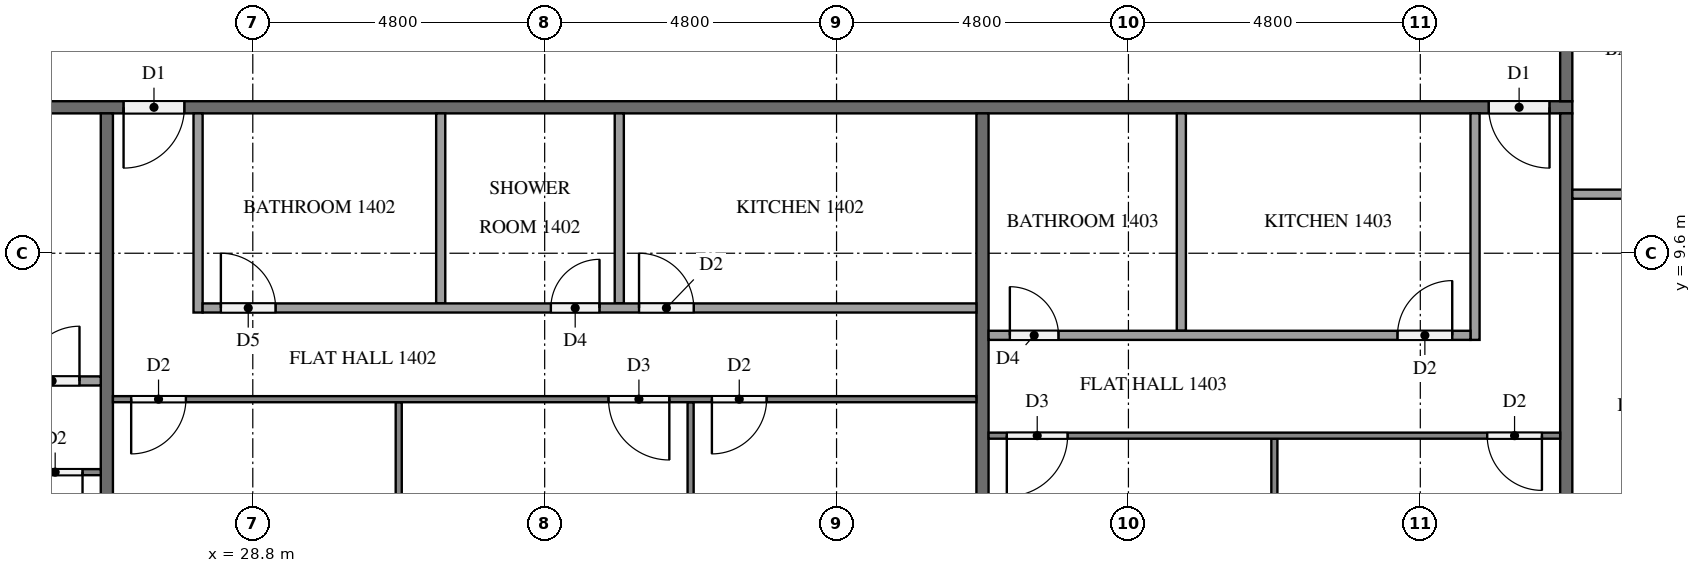
"""IFC4 building model, lengths in metres.
Left out: names, types, materials, properties, quantities, classifications, styles, units other than length and angle.
Written with IfcOpenShell. Run it as: python <this file> out.ifc"""

import sys

from ifc_helpers import new_model, si_unit, direction, frame, frame_2d, origin, place, context, subcontext, project, spatial, rectangle, extrude, element, fill, save


model = new_model("IFC4")
c1 = context("Model", 3, precision=1e-05, world=origin(), true_north=direction((0.0, 1.0)))
c2 = subcontext(c1, "Body", "Model", "MODEL_VIEW")
j1 = project(units=[si_unit("LENGTHUNIT", "METRE"), si_unit("PLANEANGLEUNIT", "RADIAN")], contexts=[c1])
p1 = place(None, origin())
s1 = spatial("IfcSite", under=j1, at=p1, CompositionType="ELEMENT")
p2 = place(p1, origin())
s2 = spatial("IfcBuilding", under=s1, at=p2, CompositionType="ELEMENT")
p3 = place(p2, frame((0.0, 0.0, 59.3)))
s3 = spatial("IfcBuildingStorey", under=s2, at=p3, CompositionType="ELEMENT", Elevation=59.3)
p4 = place(p3, frame((50.5, 12.0, 0.0), z_axis=(0.0, 0.0, 1.0), x_axis=(-1.0, 0.0, 0.0)))
e1 = element("IfcWall", 1, at=p4, inside=s3, PredefinedType="PARTITIONING", context=c2, shape_type="SweptSolid", body=[
    extrude(rectangle(XDim=38.6, YDim=0.2, at=frame_2d((19.3, 0.0))), origin(), (0.0, 0.0, 1.0), 3.2),
])
p5 = place(p4, frame((37.225, 0.0, 0.0)))
e2 = element("IfcOpeningElement", 2, at=p5, cuts=e1, PredefinedType="OPENING", context=c2, shape_type="SweptSolid", body=[
    extrude(rectangle(XDim=1.0, YDim=2.1, at=frame_2d((0.5, 1.05))), frame((0.0, 0.11, 0.0), z_axis=(0.0, -1.0, 0.0), x_axis=(1.0, 0.0, 0.0)), (0.0, 0.0, 1.0), 0.22),
])
p6 = place(p4, frame((22.825, 0.0, 0.0)))
e3 = element("IfcOpeningElement", 3, at=p6, cuts=e1, PredefinedType="OPENING", context=c2, shape_type="SweptSolid", body=[
    extrude(rectangle(XDim=1.0, YDim=2.1, at=frame_2d((0.5, 1.05))), frame((0.0, 0.11, 0.0), z_axis=(0.0, -1.0, 0.0), x_axis=(1.0, 0.0, 0.0)), (0.0, 0.0, 1.0), 0.22),
])
p7 = place(p4, frame((0.375, 0.0, 0.0)))
e4 = element("IfcOpeningElement", 4, at=p7, cuts=e1, PredefinedType="OPENING", context=c2, shape_type="SweptSolid", body=[
    extrude(rectangle(XDim=1.0, YDim=2.1, at=frame_2d((0.5, 1.05))), frame((0.0, 0.11, 0.0), z_axis=(0.0, -1.0, 0.0), x_axis=(1.0, 0.0, 0.0)), (0.0, 0.0, 1.0), 0.22),
])
p8 = place(p3, frame((50.4, 40.7, 0.0), z_axis=(0.0, 0.0, 1.0), x_axis=(0.0, -1.0, 0.0)))
e5 = element("IfcWall", 5, at=p8, inside=s3, PredefinedType="PARTITIONING", context=c2, shape_type="SweptSolid", body=[
    extrude(rectangle(XDim=28.6, YDim=0.2, at=frame_2d((14.3, 0.0))), origin(), (0.0, 0.0, 1.0), 3.2),
])
p9 = place(p8, frame((24.175, 0.0, 0.0)))
e6 = element("IfcOpeningElement", 6, at=p9, cuts=e5, PredefinedType="OPENING", context=c2, shape_type="SweptSolid", body=[
    extrude(rectangle(XDim=1.0, YDim=2.1, at=frame_2d((0.5, 1.05))), frame((0.0, 0.11, 0.0), z_axis=(0.0, -1.0, 0.0), x_axis=(1.0, 0.0, 0.0)), (0.0, 0.0, 1.0), 0.22),
])
p10 = place(p8, frame((22.625, 0.0, 0.0)))
e7 = element("IfcOpeningElement", 7, at=p10, cuts=e5, PredefinedType="OPENING", context=c2, shape_type="SweptSolid", body=[
    extrude(rectangle(XDim=1.0, YDim=2.1, at=frame_2d((0.5, 1.05))), frame((0.0, 0.11, 0.0), z_axis=(0.0, -1.0, 0.0), x_axis=(1.0, 0.0, 0.0)), (0.0, 0.0, 1.0), 0.22),
])
p11 = place(p8, frame((10.625, 0.0, 0.0)))
e8 = element("IfcOpeningElement", 8, at=p11, cuts=e5, PredefinedType="OPENING", context=c2, shape_type="SweptSolid", body=[
    extrude(rectangle(XDim=1.0, YDim=2.1, at=frame_2d((0.5, 1.05))), frame((0.0, 0.11, 0.0), z_axis=(0.0, -1.0, 0.0), x_axis=(1.0, 0.0, 0.0)), (0.0, 0.0, 1.0), 0.22),
])
for number, where, z_axis, x_axis in (
    (9, (26.4, 11.9, 0.0), (0.0, 0.0, 1.0), (0.0, -1.0, 0.0)),
    (10, (40.8, 11.9, 0.0), (0.0, 0.0, 1.0), (0.0, -1.0, 0.0)),
    (11, (50.4, 11.9, 0.0), (0.0, 0.0, 1.0), (0.0, -1.0, 0.0)),
):
    element("IfcWall", number, at=place(p3, frame(where, z_axis=z_axis, x_axis=x_axis)), inside=s3, PredefinedType="PARTITIONING", context=c2, shape_type="SweptSolid", body=[
        extrude(rectangle(XDim=11.8, YDim=0.2, at=frame_2d((5.9, 0.0))), origin(), (0.0, 0.0, 1.0), 3.2),
    ])
p12 = place(p3, frame((26.3, 6.0, 0.0), z_axis=(0.0, 0.0, 1.0), x_axis=(-1.0, 0.0, 0.0)))
e12 = element("IfcWall", 12, at=p12, inside=s3, PredefinedType="PARTITIONING", context=c2, shape_type="SweptSolid", body=[
    extrude(rectangle(XDim=14.2, YDim=0.1, at=frame_2d((7.1, 0.0))), origin(), (0.0, 0.0, 1.0), 3.2),
])
p13 = place(p12, frame((9.85, 0.0, 0.0)))
e13 = element("IfcOpeningElement", 13, at=p13, cuts=e12, PredefinedType="OPENING", context=c2, shape_type="SweptSolid", body=[
    extrude(rectangle(XDim=0.9, YDim=2.1, at=frame_2d((0.45, 1.05))), frame((0.0, 0.06, 0.0), z_axis=(0.0, -1.0, 0.0), x_axis=(1.0, 0.0, 0.0)), (0.0, 0.0, 1.0), 0.12),
])
p14 = place(p12, frame((8.15, 0.0, 0.0)))
e14 = element("IfcOpeningElement", 14, at=p14, cuts=e12, PredefinedType="OPENING", context=c2, shape_type="SweptSolid", body=[
    extrude(rectangle(XDim=1.0, YDim=2.1, at=frame_2d((0.5, 1.05))), frame((0.0, 0.06, 0.0), z_axis=(0.0, -1.0, 0.0), x_axis=(1.0, 0.0, 0.0)), (0.0, 0.0, 1.0), 0.12),
])
p15 = place(p12, frame((0.3, 0.0, 0.0)))
e15 = element("IfcOpeningElement", 15, at=p15, cuts=e12, PredefinedType="OPENING", context=c2, shape_type="SweptSolid", body=[
    extrude(rectangle(XDim=0.9, YDim=2.1, at=frame_2d((0.45, 1.05))), frame((0.0, 0.06, 0.0), z_axis=(0.0, -1.0, 0.0), x_axis=(1.0, 0.0, 0.0)), (0.0, 0.0, 1.0), 0.12),
])
p16 = place(p3, frame((13.575, 7.5, 0.0), z_axis=(0.0, 0.0, 1.0), x_axis=(1.0, 0.0, 0.0)))
e16 = element("IfcWall", 16, at=p16, inside=s3, PredefinedType="PARTITIONING", context=c2, shape_type="SweptSolid", body=[
    extrude(rectangle(XDim=12.725, YDim=0.15, at=frame_2d((6.363, 0.0))), origin(), (0.0, 0.0, 1.0), 3.2),
])
p17 = place(p16, frame((2.69, 0.0, 0.0)))
e17 = element("IfcOpeningElement", 17, at=p17, cuts=e16, PredefinedType="OPENING", context=c2, shape_type="SweptSolid", body=[
    extrude(rectangle(XDim=0.9, YDim=2.1, at=frame_2d((0.45, 1.05))), frame((0.0, 0.085, 0.0), z_axis=(0.0, -1.0, 0.0), x_axis=(1.0, 0.0, 0.0)), (0.0, 0.0, 1.0), 0.17),
])
p18 = place(p16, frame((4.24, 0.0, 0.0)))
e18 = element("IfcOpeningElement", 18, at=p18, cuts=e16, PredefinedType="OPENING", context=c2, shape_type="SweptSolid", body=[
    extrude(rectangle(XDim=0.8, YDim=2.1, at=frame_2d((0.4, 1.05))), frame((0.0, 0.085, 0.0), z_axis=(0.0, -1.0, 0.0), x_axis=(1.0, 0.0, 0.0)), (0.0, 0.0, 1.0), 0.17),
])
p19 = place(p16, frame((11.475, 0.0, 0.0)))
e19 = element("IfcOpeningElement", 19, at=p19, cuts=e16, PredefinedType="OPENING", context=c2, shape_type="SweptSolid", body=[
    extrude(rectangle(XDim=0.9, YDim=2.1, at=frame_2d((0.45, 1.05))), frame((0.0, 0.085, 0.0), z_axis=(0.0, -1.0, 0.0), x_axis=(1.0, 0.0, 0.0)), (0.0, 0.0, 1.0), 0.17),
])
for number, where, z_axis, x_axis in (
    (20, (31.2, 7.15, 0.0), (0.0, 0.0, 1.0), (0.0, -1.0, 0.0)),
    (21, (36.0, 7.15, 0.0), (0.0, 0.0, 1.0), (0.0, -1.0, 0.0)),
):
    element("IfcWall", number, at=place(p3, frame(where, z_axis=z_axis, x_axis=x_axis)), inside=s3, PredefinedType="PARTITIONING", context=c2, shape_type="SweptSolid", body=[
        extrude(rectangle(XDim=7.05, YDim=0.1, at=frame_2d((3.525, 0.0))), origin(), (0.0, 0.0, 1.0), 3.2),
    ])
p20 = place(p3, frame((40.7, 7.2, 0.0), z_axis=(0.0, 0.0, 1.0), x_axis=(-1.0, 0.0, 0.0)))
e22 = element("IfcWall", 22, at=p20, inside=s3, PredefinedType="PARTITIONING", context=c2, shape_type="SweptSolid", body=[
    extrude(rectangle(XDim=14.2, YDim=0.1, at=frame_2d((7.1, 0.0))), origin(), (0.0, 0.0, 1.0), 3.2),
])
p21 = place(p20, frame((13.0, 0.0, 0.0)))
e23 = element("IfcOpeningElement", 23, at=p21, cuts=e22, PredefinedType="OPENING", context=c2, shape_type="SweptSolid", body=[
    extrude(rectangle(XDim=0.9, YDim=2.1, at=frame_2d((0.45, 1.05))), frame((0.0, 0.06, 0.0), z_axis=(0.0, -1.0, 0.0), x_axis=(1.0, 0.0, 0.0)), (0.0, 0.0, 1.0), 0.12),
])
p22 = place(p20, frame((5.05, 0.0, 0.0)))
e24 = element("IfcOpeningElement", 24, at=p22, cuts=e22, PredefinedType="OPENING", context=c2, shape_type="SweptSolid", body=[
    extrude(rectangle(XDim=1.0, YDim=2.1, at=frame_2d((0.5, 1.05))), frame((0.0, 0.06, 0.0), z_axis=(0.0, -1.0, 0.0), x_axis=(1.0, 0.0, 0.0)), (0.0, 0.0, 1.0), 0.12),
])
p23 = place(p20, frame((3.45, 0.0, 0.0)))
e25 = element("IfcOpeningElement", 25, at=p23, cuts=e22, PredefinedType="OPENING", context=c2, shape_type="SweptSolid", body=[
    extrude(rectangle(XDim=0.9, YDim=2.1, at=frame_2d((0.45, 1.05))), frame((0.0, 0.06, 0.0), z_axis=(0.0, -1.0, 0.0), x_axis=(1.0, 0.0, 0.0)), (0.0, 0.0, 1.0), 0.12),
])
for number, where, z_axis, x_axis in (
    (26, (31.89, 11.9, 0.0), (0.0, 0.0, 1.0), (0.0, -1.0, 0.0)),
    (27, (34.827, 11.9, 0.0), (0.0, 0.0, 1.0), (0.0, -1.0, 0.0)),
):
    element("IfcWall", number, at=place(p3, frame(where, z_axis=z_axis, x_axis=x_axis)), inside=s3, PredefinedType="PARTITIONING", context=c2, shape_type="SweptSolid", body=[
        extrude(rectangle(XDim=3.125, YDim=0.15, at=frame_2d((1.562, 0.0))), origin(), (0.0, 0.0, 1.0), 3.2),
    ])
p24 = place(p3, frame((27.9, 11.9, 0.0), z_axis=(0.0, 0.0, 1.0), x_axis=(0.0, -1.0, 0.0)))
e28 = element("IfcWall", 28, at=p24, inside=s3, PredefinedType="PARTITIONING", context=c2, shape_type="SweptSolid", body=[
    extrude(rectangle(XDim=3.275, YDim=0.15, at=frame_2d((1.637, 0.0))), origin(), (0.0, 0.0, 1.0), 3.2),
])
p25 = place(p3, frame((27.975, 8.7, 0.0), z_axis=(0.0, 0.0, 1.0), x_axis=(1.0, 0.0, 0.0)))
e29 = element("IfcWall", 29, at=p25, inside=s3, PredefinedType="PARTITIONING", context=c2, shape_type="SweptSolid", body=[
    extrude(rectangle(XDim=12.725, YDim=0.15, at=frame_2d((6.362, 0.0))), origin(), (0.0, 0.0, 1.0), 3.2),
])
p26 = place(p25, frame((0.3, 0.0, 0.0)))
e30 = element("IfcOpeningElement", 30, at=p26, cuts=e29, PredefinedType="OPENING", context=c2, shape_type="SweptSolid", body=[
    extrude(rectangle(XDim=0.9, YDim=2.1, at=frame_2d((0.45, 1.05))), frame((0.0, 0.085, 0.0), z_axis=(0.0, -1.0, 0.0), x_axis=(1.0, 0.0, 0.0)), (0.0, 0.0, 1.0), 0.17),
])
p27 = place(p25, frame((5.727, 0.0, 0.0)))
e31 = element("IfcOpeningElement", 31, at=p27, cuts=e29, PredefinedType="OPENING", context=c2, shape_type="SweptSolid", body=[
    extrude(rectangle(XDim=0.8, YDim=2.1, at=frame_2d((0.4, 1.05))), frame((0.0, 0.085, 0.0), z_axis=(0.0, -1.0, 0.0), x_axis=(1.0, 0.0, 0.0)), (0.0, 0.0, 1.0), 0.17),
])
p28 = place(p25, frame((7.177, 0.0, 0.0)))
e32 = element("IfcOpeningElement", 32, at=p28, cuts=e29, PredefinedType="OPENING", context=c2, shape_type="SweptSolid", body=[
    extrude(rectangle(XDim=0.9, YDim=2.1, at=frame_2d((0.45, 1.05))), frame((0.0, 0.085, 0.0), z_axis=(0.0, -1.0, 0.0), x_axis=(1.0, 0.0, 0.0)), (0.0, 0.0, 1.0), 0.17),
])
p29 = place(p3, frame((45.6, 6.55, 0.0), z_axis=(0.0, 0.0, 1.0), x_axis=(0.0, -1.0, 0.0)))
e33 = element("IfcWall", 33, at=p29, inside=s3, PredefinedType="PARTITIONING", context=c2, shape_type="SweptSolid", body=[
    extrude(rectangle(XDim=6.45, YDim=0.1, at=frame_2d((3.225, 0.0))), origin(), (0.0, 0.0, 1.0), 3.2),
])
p30 = place(p3, frame((50.3, 6.6, 0.0), z_axis=(0.0, 0.0, 1.0), x_axis=(-1.0, 0.0, 0.0)))
e34 = element("IfcWall", 34, at=p30, inside=s3, PredefinedType="PARTITIONING", context=c2, shape_type="SweptSolid", body=[
    extrude(rectangle(XDim=9.4, YDim=0.1, at=frame_2d((4.7, 0.0))), origin(), (0.0, 0.0, 1.0), 3.2),
])
p31 = place(p30, frame((0.3, 0.0, 0.0)))
e35 = element("IfcOpeningElement", 35, at=p31, cuts=e34, PredefinedType="OPENING", context=c2, shape_type="SweptSolid", body=[
    extrude(rectangle(XDim=0.9, YDim=2.1, at=frame_2d((0.45, 1.05))), frame((0.0, 0.06, 0.0), z_axis=(0.0, -1.0, 0.0), x_axis=(1.0, 0.0, 0.0)), (0.0, 0.0, 1.0), 0.12),
])
p32 = place(p30, frame((8.1, 0.0, 0.0)))
e36 = element("IfcOpeningElement", 36, at=p32, cuts=e34, PredefinedType="OPENING", context=c2, shape_type="SweptSolid", body=[
    extrude(rectangle(XDim=1.0, YDim=2.1, at=frame_2d((0.5, 1.05))), frame((0.0, 0.06, 0.0), z_axis=(0.0, -1.0, 0.0), x_axis=(1.0, 0.0, 0.0)), (0.0, 0.0, 1.0), 0.12),
])
p33 = place(p3, frame((44.07, 11.9, 0.0), z_axis=(0.0, 0.0, 1.0), x_axis=(0.0, -1.0, 0.0)))
e37 = element("IfcWall", 37, at=p33, inside=s3, PredefinedType="PARTITIONING", context=c2, shape_type="SweptSolid", body=[
    extrude(rectangle(XDim=3.575, YDim=0.15, at=frame_2d((1.788, 0.0))), origin(), (0.0, 0.0, 1.0), 3.2),
])
p34 = place(p3, frame((48.9, 11.9, 0.0), z_axis=(0.0, 0.0, 1.0), x_axis=(0.0, -1.0, 0.0)))
e38 = element("IfcWall", 38, at=p34, inside=s3, PredefinedType="PARTITIONING", context=c2, shape_type="SweptSolid", body=[
    extrude(rectangle(XDim=3.725, YDim=0.15, at=frame_2d((1.862, 0.0))), origin(), (0.0, 0.0, 1.0), 3.2),
])
p35 = place(p3, frame((40.9, 8.25, 0.0), z_axis=(0.0, 0.0, 1.0), x_axis=(1.0, 0.0, 0.0)))
e39 = element("IfcWall", 39, at=p35, inside=s3, PredefinedType="PARTITIONING", context=c2, shape_type="SweptSolid", body=[
    extrude(rectangle(XDim=7.925, YDim=0.15, at=frame_2d((3.962, 0.0))), origin(), (0.0, 0.0, 1.0), 3.2),
])
p36 = place(p35, frame((6.725, 0.0, 0.0)))
e40 = element("IfcOpeningElement", 40, at=p36, cuts=e39, PredefinedType="OPENING", context=c2, shape_type="SweptSolid", body=[
    extrude(rectangle(XDim=0.9, YDim=2.1, at=frame_2d((0.45, 1.05))), frame((0.0, 0.085, 0.0), z_axis=(0.0, -1.0, 0.0), x_axis=(1.0, 0.0, 0.0)), (0.0, 0.0, 1.0), 0.17),
])
p37 = place(p35, frame((0.35, 0.0, 0.0)))
e41 = element("IfcOpeningElement", 41, at=p37, cuts=e39, PredefinedType="OPENING", context=c2, shape_type="SweptSolid", body=[
    extrude(rectangle(XDim=0.8, YDim=2.1, at=frame_2d((0.4, 1.05))), frame((0.0, 0.085, 0.0), z_axis=(0.0, -1.0, 0.0), x_axis=(1.0, 0.0, 0.0)), (0.0, 0.0, 1.0), 0.17),
])
p38 = place(p3, frame((50.5, 10.571, 0.0), z_axis=(0.0, 0.0, 1.0), x_axis=(1.0, 0.0, 0.0)))
e42 = element("IfcWall", 42, at=p38, inside=s3, PredefinedType="PARTITIONING", context=c2, shape_type="SweptSolid", body=[
    extrude(rectangle(XDim=3.575, YDim=0.15, at=frame_2d((1.788, 0.0))), origin(), (0.0, 0.0, 1.0), 3.2),
])
p39 = place(p6, origin())
e43 = element("IfcDoor", 43, at=p39, inside=s3, OperationType="SINGLE_SWING_RIGHT", PredefinedType="DOOR", context=c2, shape_type="SweptSolid", body=[
    extrude(rectangle(XDim=1.0, YDim=2.1, at=frame_2d((0.5, 1.05))), frame((0.0, 0.025, 0.0), z_axis=(0.0, -1.0, 0.0), x_axis=(1.0, 0.0, 0.0)), (0.0, 0.0, 1.0), 0.05),
])
fill(e3, e43)
p40 = place(p7, origin())
e44 = element("IfcDoor", 44, at=p40, inside=s3, OperationType="SINGLE_SWING_LEFT", PredefinedType="DOOR", context=c2, shape_type="SweptSolid", body=[
    extrude(rectangle(XDim=1.0, YDim=2.1, at=frame_2d((0.5, 1.05))), frame((0.0, 0.025, 0.0), z_axis=(0.0, -1.0, 0.0), x_axis=(1.0, 0.0, 0.0)), (0.0, 0.0, 1.0), 0.05),
])
fill(e4, e44)
p41 = place(p15, origin())
e45 = element("IfcDoor", 45, at=p41, inside=s3, OperationType="SINGLE_SWING_LEFT", PredefinedType="DOOR", context=c2, shape_type="SweptSolid", body=[
    extrude(rectangle(XDim=0.9, YDim=2.1, at=frame_2d((0.45, 1.05))), frame((0.0, 0.025, 0.0), z_axis=(0.0, -1.0, 0.0), x_axis=(1.0, 0.0, 0.0)), (0.0, 0.0, 1.0), 0.05),
])
fill(e15, e45)
p42 = place(p19, origin())
e46 = element("IfcDoor", 46, at=p42, inside=s3, OperationType="SINGLE_SWING_RIGHT", PredefinedType="DOOR", context=c2, shape_type="SweptSolid", body=[
    extrude(rectangle(XDim=0.9, YDim=2.1, at=frame_2d((0.45, 1.05))), frame((0.0, 0.025, 0.0), z_axis=(0.0, -1.0, 0.0), x_axis=(1.0, 0.0, 0.0)), (0.0, 0.0, 1.0), 0.05),
])
fill(e19, e46)
p43 = place(p21, origin())
e47 = element("IfcDoor", 47, at=p43, inside=s3, OperationType="SINGLE_SWING_RIGHT", PredefinedType="DOOR", context=c2, shape_type="SweptSolid", body=[
    extrude(rectangle(XDim=0.9, YDim=2.1, at=frame_2d((0.45, 1.05))), frame((0.0, 0.025, 0.0), z_axis=(0.0, -1.0, 0.0), x_axis=(1.0, 0.0, 0.0)), (0.0, 0.0, 1.0), 0.05),
])
fill(e23, e47)
p44 = place(p22, origin())
e48 = element("IfcDoor", 48, at=p44, inside=s3, OperationType="SINGLE_SWING_LEFT", PredefinedType="DOOR", context=c2, shape_type="SweptSolid", body=[
    extrude(rectangle(XDim=1.0, YDim=2.1, at=frame_2d((0.5, 1.05))), frame((0.0, 0.025, 0.0), z_axis=(0.0, -1.0, 0.0), x_axis=(1.0, 0.0, 0.0)), (0.0, 0.0, 1.0), 0.05),
])
fill(e24, e48)
p45 = place(p23, origin())
e49 = element("IfcDoor", 49, at=p45, inside=s3, OperationType="SINGLE_SWING_RIGHT", PredefinedType="DOOR", context=c2, shape_type="SweptSolid", body=[
    extrude(rectangle(XDim=0.9, YDim=2.1, at=frame_2d((0.45, 1.05))), frame((0.0, 0.025, 0.0), z_axis=(0.0, -1.0, 0.0), x_axis=(1.0, 0.0, 0.0)), (0.0, 0.0, 1.0), 0.05),
])
fill(e25, e49)
p46 = place(p26, origin())
e50 = element("IfcDoor", 50, at=p46, inside=s3, OperationType="SINGLE_SWING_LEFT", PredefinedType="DOOR", context=c2, shape_type="SweptSolid", body=[
    extrude(rectangle(XDim=0.9, YDim=2.1, at=frame_2d((0.45, 1.05))), frame((0.0, 0.025, 0.0), z_axis=(0.0, -1.0, 0.0), x_axis=(1.0, 0.0, 0.0)), (0.0, 0.0, 1.0), 0.05),
])
fill(e30, e50)
p47 = place(p27, origin())
e51 = element("IfcDoor", 51, at=p47, inside=s3, OperationType="SINGLE_SWING_RIGHT", PredefinedType="DOOR", context=c2, shape_type="SweptSolid", body=[
    extrude(rectangle(XDim=0.8, YDim=2.1, at=frame_2d((0.4, 1.05))), frame((0.0, 0.025, 0.0), z_axis=(0.0, -1.0, 0.0), x_axis=(1.0, 0.0, 0.0)), (0.0, 0.0, 1.0), 0.05),
])
fill(e31, e51)
p48 = place(p28, origin())
e52 = element("IfcDoor", 52, at=p48, inside=s3, OperationType="SINGLE_SWING_LEFT", PredefinedType="DOOR", context=c2, shape_type="SweptSolid", body=[
    extrude(rectangle(XDim=0.9, YDim=2.1, at=frame_2d((0.45, 1.05))), frame((0.0, 0.025, 0.0), z_axis=(0.0, -1.0, 0.0), x_axis=(1.0, 0.0, 0.0)), (0.0, 0.0, 1.0), 0.05),
])
fill(e32, e52)
p49 = place(p31, origin())
e53 = element("IfcDoor", 53, at=p49, inside=s3, OperationType="SINGLE_SWING_LEFT", PredefinedType="DOOR", context=c2, shape_type="SweptSolid", body=[
    extrude(rectangle(XDim=0.9, YDim=2.1, at=frame_2d((0.45, 1.05))), frame((0.0, 0.025, 0.0), z_axis=(0.0, -1.0, 0.0), x_axis=(1.0, 0.0, 0.0)), (0.0, 0.0, 1.0), 0.05),
])
fill(e35, e53)
p50 = place(p32, origin())
e54 = element("IfcDoor", 54, at=p50, inside=s3, OperationType="SINGLE_SWING_RIGHT", PredefinedType="DOOR", context=c2, shape_type="SweptSolid", body=[
    extrude(rectangle(XDim=1.0, YDim=2.1, at=frame_2d((0.5, 1.05))), frame((0.0, 0.025, 0.0), z_axis=(0.0, -1.0, 0.0), x_axis=(1.0, 0.0, 0.0)), (0.0, 0.0, 1.0), 0.05),
])
fill(e36, e54)
p51 = place(p36, origin())
e55 = element("IfcDoor", 55, at=p51, inside=s3, OperationType="SINGLE_SWING_RIGHT", PredefinedType="DOOR", context=c2, shape_type="SweptSolid", body=[
    extrude(rectangle(XDim=0.9, YDim=2.1, at=frame_2d((0.45, 1.05))), frame((0.0, 0.025, 0.0), z_axis=(0.0, -1.0, 0.0), x_axis=(1.0, 0.0, 0.0)), (0.0, 0.0, 1.0), 0.05),
])
fill(e40, e55)
p52 = place(p37, origin())
e56 = element("IfcDoor", 56, at=p52, inside=s3, OperationType="SINGLE_SWING_LEFT", PredefinedType="DOOR", context=c2, shape_type="SweptSolid", body=[
    extrude(rectangle(XDim=0.8, YDim=2.1, at=frame_2d((0.4, 1.05))), frame((0.0, 0.025, 0.0), z_axis=(0.0, -1.0, 0.0), x_axis=(1.0, 0.0, 0.0)), (0.0, 0.0, 1.0), 0.05),
])
fill(e41, e56)
save(model, sys.argv[1])
